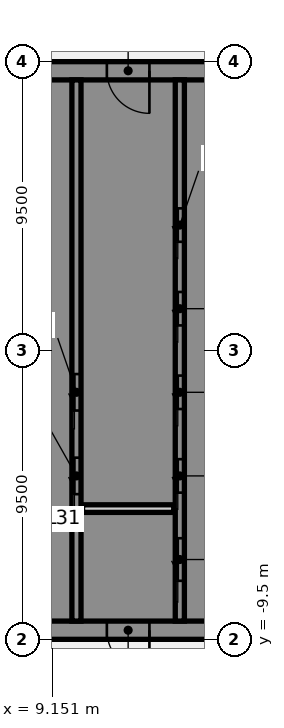
"""IFC4 building model, lengths in metres.
Left out: names, types, materials, properties, quantities, classifications, styles, units other than length and angle.
Written with IfcOpenShell. Run it as: python <this file> out.ifc"""

import sys

from ifc_helpers import new_model, si_unit, direction, frame, frame_2d, origin, place, context, subcontext, project, spatial, polyline, rectangle, outline, extrude, element, fill, save


model = new_model("IFC4")
c1 = context("Model", 3, precision=1e-05, world=origin(), true_north=direction((0.0, 1.0)))
c2 = subcontext(c1, "Body", "Model", "MODEL_VIEW")
j1 = project(units=[si_unit("LENGTHUNIT", "METRE"), si_unit("PLANEANGLEUNIT", "RADIAN")], contexts=[c1])
p1 = place(None, origin())
s1 = spatial("IfcSite", under=j1, at=p1, CompositionType="ELEMENT")
p2 = place(p1, origin())
s2 = spatial("IfcBuilding", under=s1, at=p2, CompositionType="ELEMENT")
p3 = place(p2, frame((0.0, 0.0, 128.5)))
s3 = spatial("IfcBuildingStorey", under=s2, at=p3, CompositionType="ELEMENT", Elevation=128.5)
p4 = place(p3, frame((16.5, -9.2, 0.0), z_axis=(0.0, 0.0, 1.0), x_axis=(-1.0, 0.0, 0.0)))
e1 = element("IfcWall", 1, at=p4, inside=s3, PredefinedType="SHEAR", context=c2, shape_type="SweptSolid", body=[
    extrude(rectangle(XDim=13.0, YDim=0.6, at=frame_2d((6.5, 0.0))), origin(), (0.0, 0.0, 1.0), 4.36),
])
p5 = place(p4, frame((4.15, 0.0, 0.0)))
e2 = element("IfcOpeningElement", 2, at=p5, cuts=e1, PredefinedType="OPENING", context=c2, shape_type="SweptSolid", body=[
    extrude(rectangle(XDim=1.4, YDim=2.1, at=frame_2d((0.7, 1.05))), frame((0.0, 0.31, 0.0), z_axis=(0.0, -1.0, 0.0), x_axis=(1.0, 0.0, 0.0)), (0.0, 0.0, 1.0), 0.62),
])
p6 = place(p4, frame((10.125, 0.0, 0.0)))
e3 = element("IfcOpeningElement", 3, at=p6, cuts=e1, PredefinedType="OPENING", context=c2, shape_type="SweptSolid", body=[
    extrude(rectangle(XDim=1.4, YDim=2.1, at=frame_2d((0.7, 1.05))), frame((0.0, 0.31, 0.0), z_axis=(0.0, -1.0, 0.0), x_axis=(1.0, 0.0, 0.0)), (0.0, 0.0, 1.0), 0.62),
])
p7 = place(p3, origin())
e4 = element("IfcWall", 4, at=p7, inside=s3, PredefinedType="SHEAR", context=c2, shape_type="SweptSolid", body=[
    extrude(outline(polyline([(13.5, -8.9), (15.9, -8.9), (16.5, -8.9), (16.5, 8.9), (15.9, 8.9), (13.5, 8.9), (13.5, 8.125), (15.9, 8.125), (15.9, 5.625), (13.5, 5.625), (13.5, 5.375), (15.9, 5.375), (15.9, 2.875), (13.5, 2.875), (13.5, 2.625), (15.9, 2.625), (15.9, 0.125), (13.5, 0.125), (13.5, -0.125), (15.9, -0.125), (15.9, -2.625), (13.5, -2.625), (13.5, -2.875), (15.9, -2.875), (15.9, -5.375), (13.5, -5.375), (13.5, -5.625), (15.9, -5.625), (15.9, -8.125), (13.5, -8.125), (13.5, -8.9)])), origin(), (0.0, 0.0, 1.0), 4.36),
])
p8 = place(p3, frame((16.5, 9.2, 0.0), z_axis=(0.0, 0.0, 1.0), x_axis=(-1.0, 0.0, 0.0)))
e5 = element("IfcWall", 5, at=p8, inside=s3, PredefinedType="SHEAR", context=c2, shape_type="SweptSolid", body=[
    extrude(rectangle(XDim=13.0, YDim=0.6, at=frame_2d((6.5, 0.0))), origin(), (0.0, 0.0, 1.0), 4.36),
])
p9 = place(p8, frame((4.15, 0.0, 0.0)))
e6 = element("IfcOpeningElement", 6, at=p9, cuts=e5, PredefinedType="OPENING", context=c2, shape_type="SweptSolid", body=[
    extrude(rectangle(XDim=1.4, YDim=2.1, at=frame_2d((0.7, 1.05))), frame((0.0, 0.31, 0.0), z_axis=(0.0, -1.0, 0.0), x_axis=(1.0, 0.0, 0.0)), (0.0, 0.0, 1.0), 0.62),
])
p10 = place(p3, origin())
e7 = element("IfcWall", 7, at=p10, inside=s3, PredefinedType="SHEAR", context=c2, shape_type="SweptSolid", body=[
    extrude(outline(polyline([(9.8, -5.375), (7.5, -5.375), (7.5, -2.875), (9.8, -2.875), (9.8, -2.625), (7.5, -2.625), (7.5, -0.125), (9.8, -0.125), (9.8, 0.125), (7.5, 0.125), (7.5, 2.625), (9.8, 2.625), (9.8, 2.875), (7.5, 2.875), (7.5, 5.375), (9.8, 5.375), (9.8, 5.625), (7.5, 5.625), (7.5, 8.125), (9.8, 8.125), (9.8, 8.9), (7.5, 8.9), (7.2, 8.9), (7.2, -5.625), (7.5, -5.625), (9.8, -5.625), (9.8, -5.375)])), origin(), (0.0, 0.0, 1.0), 4.36),
])
p11 = place(p3, origin())
e8 = element("IfcWall", 8, at=p11, inside=s3, PredefinedType="SHEAR", context=c2, shape_type="SweptSolid", body=[
    extrude(outline(polyline([(7.5, -8.125), (7.5, -8.9), (9.8, -8.9), (9.8, -8.125), (9.8, -5.625), (9.55, -5.625), (9.55, -8.125), (7.5, -8.125)])), origin(), (0.0, 0.0, 1.0), 4.36),
])
p12 = place(p3, frame((13.35, -8.9, 0.0), z_axis=(0.0, 0.0, 1.0), x_axis=(0.0, 1.0, 0.0)))
e9 = element("IfcWall", 9, at=p12, inside=s3, PredefinedType="SHEAR", context=c2, shape_type="SweptSolid", body=[
    extrude(rectangle(XDim=17.8, YDim=0.3, at=frame_2d((8.9, 0.0))), origin(), (0.0, 0.0, 1.0), 4.36),
])
p13 = place(p12, frame((1.325, 0.0, 0.0)))
e10 = element("IfcOpeningElement", 10, at=p13, cuts=e9, PredefinedType="OPENING", context=c2, shape_type="SweptSolid", body=[
    extrude(rectangle(XDim=1.4, YDim=2.1, at=frame_2d((0.7, 1.05))), frame((0.0, 0.16, 0.0), z_axis=(0.0, -1.0, 0.0), x_axis=(1.0, 0.0, 0.0)), (0.0, 0.0, 1.0), 0.32),
])
p14 = place(p12, frame((4.225, 0.0, 0.0)))
e11 = element("IfcOpeningElement", 11, at=p14, cuts=e9, PredefinedType="OPENING", context=c2, shape_type="SweptSolid", body=[
    extrude(rectangle(XDim=1.1, YDim=2.1, at=frame_2d((0.55, 1.05))), frame((0.0, 0.16, 0.0), z_axis=(0.0, -1.0, 0.0), x_axis=(1.0, 0.0, 0.0)), (0.0, 0.0, 1.0), 0.32),
])
p15 = place(p12, frame((6.975, 0.0, 0.0)))
e12 = element("IfcOpeningElement", 12, at=p15, cuts=e9, PredefinedType="OPENING", context=c2, shape_type="SweptSolid", body=[
    extrude(rectangle(XDim=1.1, YDim=2.1, at=frame_2d((0.55, 1.05))), frame((0.0, 0.16, 0.0), z_axis=(0.0, -1.0, 0.0), x_axis=(1.0, 0.0, 0.0)), (0.0, 0.0, 1.0), 0.32),
])
p16 = place(p12, frame((9.725, 0.0, 0.0)))
e13 = element("IfcOpeningElement", 13, at=p16, cuts=e9, PredefinedType="OPENING", context=c2, shape_type="SweptSolid", body=[
    extrude(rectangle(XDim=1.1, YDim=2.1, at=frame_2d((0.55, 1.05))), frame((0.0, 0.16, 0.0), z_axis=(0.0, -1.0, 0.0), x_axis=(1.0, 0.0, 0.0)), (0.0, 0.0, 1.0), 0.32),
])
p17 = place(p12, frame((12.475, 0.0, 0.0)))
e14 = element("IfcOpeningElement", 14, at=p17, cuts=e9, PredefinedType="OPENING", context=c2, shape_type="SweptSolid", body=[
    extrude(rectangle(XDim=1.1, YDim=2.1, at=frame_2d((0.55, 1.05))), frame((0.0, 0.16, 0.0), z_axis=(0.0, -1.0, 0.0), x_axis=(1.0, 0.0, 0.0)), (0.0, 0.0, 1.0), 0.32),
])
p18 = place(p3, frame((9.95, -8.9, 0.0), z_axis=(0.0, 0.0, 1.0), x_axis=(0.0, 1.0, 0.0)))
e15 = element("IfcWall", 15, at=p18, inside=s3, PredefinedType="SHEAR", context=c2, shape_type="SweptSolid", body=[
    extrude(rectangle(XDim=17.8, YDim=0.3, at=frame_2d((8.9, 0.0))), origin(), (0.0, 0.0, 1.0), 4.36),
])
p19 = place(p18, frame((4.175, 0.0, 0.0)))
e16 = element("IfcOpeningElement", 16, at=p19, cuts=e15, PredefinedType="OPENING", context=c2, shape_type="SweptSolid", body=[
    extrude(rectangle(XDim=1.2, YDim=2.1, at=frame_2d((0.6, 1.05))), frame((0.0, 0.16, 0.0), z_axis=(0.0, -1.0, 0.0), x_axis=(1.0, 0.0, 0.0)), (0.0, 0.0, 1.0), 0.32),
])
p20 = place(p18, frame((6.925, 0.0, 0.0)))
e17 = element("IfcOpeningElement", 17, at=p20, cuts=e15, PredefinedType="OPENING", context=c2, shape_type="SweptSolid", body=[
    extrude(rectangle(XDim=1.2, YDim=2.1, at=frame_2d((0.6, 1.05))), frame((0.0, 0.16, 0.0), z_axis=(0.0, -1.0, 0.0), x_axis=(1.0, 0.0, 0.0)), (0.0, 0.0, 1.0), 0.32),
])
p21 = place(p3, frame((13.15, -5.2, 0.0), z_axis=(0.0, 0.0, 1.0), x_axis=(-1.0, 0.0, 0.0)))
e18 = element("IfcWall", 18, at=p21, inside=s3, PredefinedType="PARTITIONING", context=c2, shape_type="SweptSolid", body=[
    extrude(rectangle(XDim=3.0, YDim=0.25, at=frame_2d((1.5, 0.0))), origin(), (0.0, 0.0, 1.0), 4.36),
])
p22 = place(p5, origin())
e19 = element("IfcDoor", 19, at=p22, inside=s3, OperationType="SINGLE_SWING_LEFT", PredefinedType="DOOR", context=c2, shape_type="SweptSolid", body=[
    extrude(rectangle(XDim=1.4, YDim=2.1, at=frame_2d((0.7, 1.05))), frame((0.0, 0.025, 0.0), z_axis=(0.0, -1.0, 0.0), x_axis=(1.0, 0.0, 0.0)), (0.0, 0.0, 1.0), 0.05),
])
fill(e2, e19)
p23 = place(p13, origin())
e20 = element("IfcDoor", 20, at=p23, inside=s3, OperationType="SLIDING_TO_LEFT", PredefinedType="DOOR", context=c2, shape_type="SweptSolid", body=[
    extrude(rectangle(XDim=1.4, YDim=2.1, at=frame_2d((0.7, 1.05))), frame((0.0, 0.025, 0.0), z_axis=(0.0, -1.0, 0.0), x_axis=(1.0, 0.0, 0.0)), (0.0, 0.0, 1.0), 0.05),
])
fill(e10, e20)
p24 = place(p14, origin())
e21 = element("IfcDoor", 21, at=p24, inside=s3, OperationType="SLIDING_TO_LEFT", PredefinedType="DOOR", context=c2, shape_type="SweptSolid", body=[
    extrude(rectangle(XDim=1.1, YDim=2.1, at=frame_2d((0.55, 1.05))), frame((0.0, 0.025, 0.0), z_axis=(0.0, -1.0, 0.0), x_axis=(1.0, 0.0, 0.0)), (0.0, 0.0, 1.0), 0.05),
])
fill(e11, e21)
p25 = place(p15, origin())
e22 = element("IfcDoor", 22, at=p25, inside=s3, OperationType="SLIDING_TO_LEFT", PredefinedType="DOOR", context=c2, shape_type="SweptSolid", body=[
    extrude(rectangle(XDim=1.1, YDim=2.1, at=frame_2d((0.55, 1.05))), frame((0.0, 0.025, 0.0), z_axis=(0.0, -1.0, 0.0), x_axis=(1.0, 0.0, 0.0)), (0.0, 0.0, 1.0), 0.05),
])
fill(e12, e22)
p26 = place(p16, origin())
e23 = element("IfcDoor", 23, at=p26, inside=s3, OperationType="SLIDING_TO_LEFT", PredefinedType="DOOR", context=c2, shape_type="SweptSolid", body=[
    extrude(rectangle(XDim=1.1, YDim=2.1, at=frame_2d((0.55, 1.05))), frame((0.0, 0.025, 0.0), z_axis=(0.0, -1.0, 0.0), x_axis=(1.0, 0.0, 0.0)), (0.0, 0.0, 1.0), 0.05),
])
fill(e13, e23)
p27 = place(p17, origin())
e24 = element("IfcDoor", 24, at=p27, inside=s3, OperationType="SLIDING_TO_LEFT", PredefinedType="DOOR", context=c2, shape_type="SweptSolid", body=[
    extrude(rectangle(XDim=1.1, YDim=2.1, at=frame_2d((0.55, 1.05))), frame((0.0, 0.025, 0.0), z_axis=(0.0, -1.0, 0.0), x_axis=(1.0, 0.0, 0.0)), (0.0, 0.0, 1.0), 0.05),
])
fill(e14, e24)
p28 = place(p19, origin())
e25 = element("IfcDoor", 25, at=p28, inside=s3, OperationType="SLIDING_TO_LEFT", PredefinedType="DOOR", context=c2, shape_type="SweptSolid", body=[
    extrude(rectangle(XDim=1.2, YDim=2.1, at=frame_2d((0.6, 1.05))), frame((0.0, 0.025, 0.0), z_axis=(0.0, -1.0, 0.0), x_axis=(1.0, 0.0, 0.0)), (0.0, 0.0, 1.0), 0.05),
])
fill(e16, e25)
p29 = place(p20, origin())
e26 = element("IfcDoor", 26, at=p29, inside=s3, OperationType="SLIDING_TO_LEFT", PredefinedType="DOOR", context=c2, shape_type="SweptSolid", body=[
    extrude(rectangle(XDim=1.2, YDim=2.1, at=frame_2d((0.6, 1.05))), frame((0.0, 0.025, 0.0), z_axis=(0.0, -1.0, 0.0), x_axis=(1.0, 0.0, 0.0)), (0.0, 0.0, 1.0), 0.05),
])
fill(e17, e26)
p30 = place(p9, origin())
e27 = element("IfcDoor", 27, at=p30, inside=s3, OperationType="SINGLE_SWING_LEFT", PredefinedType="DOOR", context=c2, shape_type="SweptSolid", body=[
    extrude(rectangle(XDim=1.4, YDim=2.1, at=frame_2d((0.7, 1.05))), frame((0.0, 0.025, 0.0), z_axis=(0.0, -1.0, 0.0), x_axis=(1.0, 0.0, 0.0)), (0.0, 0.0, 1.0), 0.05),
])
fill(e6, e27)
save(model, sys.argv[1])
